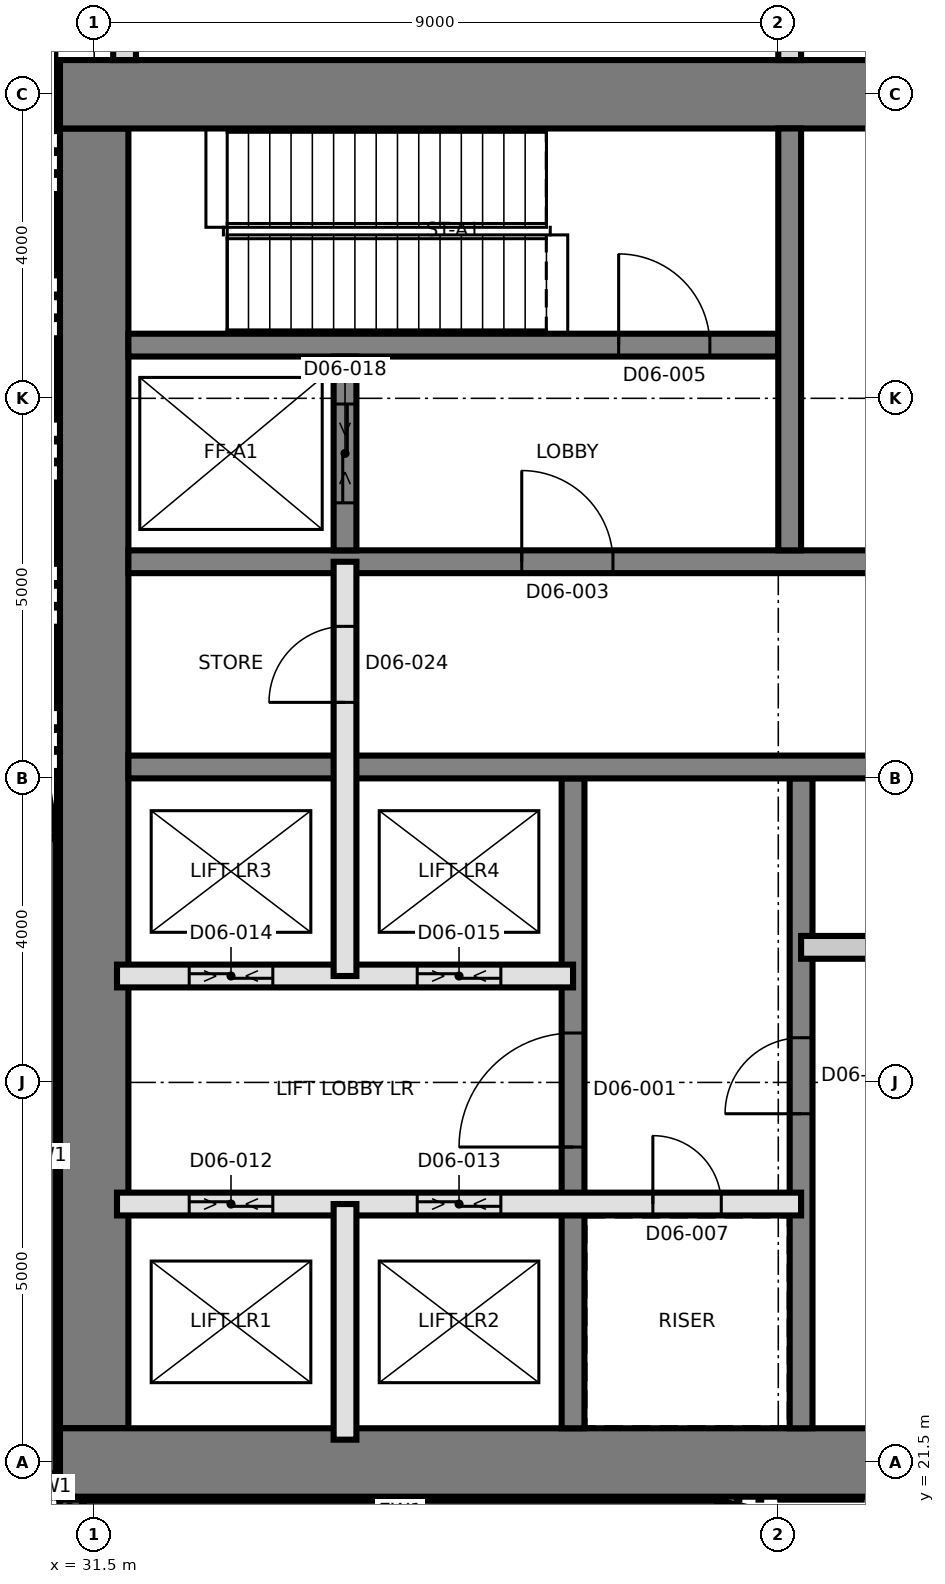
"""IFC4 building model, lengths in metres.
Left out: names, types, materials, properties, quantities, classifications, styles, units other than length and angle.
Written with IfcOpenShell. Run it as: python <this file> out.ifc"""

import sys

from ifc_helpers import new_model, si_unit, direction, frame, frame_2d, origin, place, context, subcontext, project, spatial, rectangle, extrude, element, fill, save


model = new_model("IFC4")
c1 = context("Model", 3, precision=1e-05, world=origin(), true_north=direction((0.0, 1.0)))
c2 = subcontext(c1, "Body", "Model", "MODEL_VIEW")
j1 = project(units=[si_unit("LENGTHUNIT", "METRE"), si_unit("PLANEANGLEUNIT", "RADIAN")], contexts=[c1])
p1 = place(None, origin())
s1 = spatial("IfcSite", under=j1, at=p1, CompositionType="ELEMENT")
p2 = place(p1, origin())
s2 = spatial("IfcBuilding", under=s1, at=p2, CompositionType="ELEMENT")
p3 = place(p2, frame((0.0, 0.0, 81.6)))
s3 = spatial("IfcBuildingStorey", under=s2, at=p3, CompositionType="ELEMENT", Elevation=81.6)
p4 = place(p3, frame((31.5, 21.95, 0.0), z_axis=(0.0, 0.0, 1.0), x_axis=(0.0, 1.0, 0.0)))
e1 = element("IfcWall", 1, at=p4, inside=s3, PredefinedType="SHEAR", context=c2, shape_type="SweptSolid", body=[
    extrude(rectangle(XDim=17.1, YDim=0.9, at=frame_2d((8.55, 0.0))), origin(), (0.0, 0.0, 1.0), 5.5),
])
p5 = place(p3, frame((31.05, 21.5, 0.0), z_axis=(0.0, 0.0, 1.0), x_axis=(1.0, 0.0, 0.0)))
e2 = element("IfcWall", 2, at=p5, inside=s3, PredefinedType="SHEAR", context=c2, shape_type="SweptSolid", body=[
    extrude(rectangle(XDim=27.0, YDim=0.9, at=frame_2d((13.5, 0.0))), origin(), (0.0, 0.0, 1.0), 5.5),
])
p6 = place(p3, frame((31.05, 39.5, 0.0), z_axis=(0.0, 0.0, 1.0), x_axis=(1.0, 0.0, 0.0)))
e3 = element("IfcWall", 3, at=p6, inside=s3, PredefinedType="SHEAR", context=c2, shape_type="SweptSolid", body=[
    extrude(rectangle(XDim=27.0, YDim=0.9, at=frame_2d((13.5, 0.0))), origin(), (0.0, 0.0, 1.0), 5.5),
])
p7 = place(p6, frame((10.65, 0.0, 0.0)))
e4 = element("IfcOpeningElement", 4, at=p7, cuts=e3, PredefinedType="OPENING", context=c2, shape_type="SweptSolid", body=[
    extrude(rectangle(XDim=1.2, YDim=2.1, at=frame_2d((0.6, 1.05))), frame((0.0, 0.46, 0.0), z_axis=(0.0, -1.0, 0.0), x_axis=(1.0, 0.0, 0.0)), (0.0, 0.0, 1.0), 0.92),
])
p8 = place(p3, frame((37.8, 21.95, 0.0), z_axis=(0.0, 0.0, 1.0), x_axis=(0.0, 1.0, 0.0)))
e5 = element("IfcWall", 5, at=p8, inside=s3, PredefinedType="SHEAR", context=c2, shape_type="SweptSolid", body=[
    extrude(rectangle(XDim=8.55, YDim=0.3, at=frame_2d((4.275, 0.0))), origin(), (0.0, 0.0, 1.0), 5.5),
])
p9 = place(p8, frame((3.7, 0.0, 0.0)))
e6 = element("IfcOpeningElement", 6, at=p9, cuts=e5, PredefinedType="OPENING", context=c2, shape_type="SweptSolid", body=[
    extrude(rectangle(XDim=1.5, YDim=2.1, at=frame_2d((0.75, 1.05))), frame((0.0, 0.16, 0.0), z_axis=(0.0, -1.0, 0.0), x_axis=(1.0, 0.0, 0.0)), (0.0, 0.0, 1.0), 0.32),
])
p10 = place(p3, frame((40.8, 21.95, 0.0), z_axis=(0.0, 0.0, 1.0), x_axis=(0.0, 1.0, 0.0)))
e7 = element("IfcWall", 7, at=p10, inside=s3, PredefinedType="SHEAR", context=c2, shape_type="SweptSolid", body=[
    extrude(rectangle(XDim=8.55, YDim=0.3, at=frame_2d((4.275, 0.0))), origin(), (0.0, 0.0, 1.0), 5.5),
])
p11 = place(p10, frame((4.138, 0.0, 0.0)))
e8 = element("IfcOpeningElement", 8, at=p11, cuts=e7, PredefinedType="OPENING", context=c2, shape_type="SweptSolid", body=[
    extrude(rectangle(XDim=1.0, YDim=2.1, at=frame_2d((0.5, 1.05))), frame((0.0, 0.16, 0.0), z_axis=(0.0, -1.0, 0.0), x_axis=(1.0, 0.0, 0.0)), (0.0, 0.0, 1.0), 0.32),
])
p12 = place(p3, frame((31.95, 30.65, 0.0), z_axis=(0.0, 0.0, 1.0), x_axis=(1.0, 0.0, 0.0)))
e9 = element("IfcWall", 9, at=p12, inside=s3, PredefinedType="SHEAR", context=c2, shape_type="SweptSolid", body=[
    extrude(rectangle(XDim=26.1, YDim=0.3, at=frame_2d((13.05, 0.0))), origin(), (0.0, 0.0, 1.0), 5.5),
])
p13 = place(p12, frame((24.55, 0.0, 0.0)))
e10 = element("IfcOpeningElement", 10, at=p13, cuts=e9, PredefinedType="OPENING", context=c2, shape_type="SweptSolid", body=[
    extrude(rectangle(XDim=1.0, YDim=2.1, at=frame_2d((0.5, 1.05))), frame((0.0, 0.16, 0.0), z_axis=(0.0, -1.0, 0.0), x_axis=(1.0, 0.0, 0.0)), (0.0, 0.0, 1.0), 0.32),
])
p14 = place(p12, frame((11.35, 0.0, 0.0)))
e11 = element("IfcOpeningElement", 11, at=p14, cuts=e9, PredefinedType="OPENING", context=c2, shape_type="SweptSolid", body=[
    extrude(rectangle(XDim=1.0, YDim=2.1, at=frame_2d((0.5, 1.05))), frame((0.0, 0.16, 0.0), z_axis=(0.0, -1.0, 0.0), x_axis=(1.0, 0.0, 0.0)), (0.0, 0.0, 1.0), 0.32),
])
p15 = place(p3, frame((31.95, 33.35, 0.0), z_axis=(0.0, 0.0, 1.0), x_axis=(1.0, 0.0, 0.0)))
e12 = element("IfcWall", 12, at=p15, inside=s3, PredefinedType="SHEAR", context=c2, shape_type="SweptSolid", body=[
    extrude(rectangle(XDim=26.1, YDim=0.3, at=frame_2d((13.05, 0.0))), origin(), (0.0, 0.0, 1.0), 5.5),
])
p16 = place(p15, frame((13.7, 0.0, 0.0)))
e13 = element("IfcOpeningElement", 13, at=p16, cuts=e12, PredefinedType="OPENING", context=c2, shape_type="SweptSolid", body=[
    extrude(rectangle(XDim=1.4, YDim=2.1, at=frame_2d((0.7, 1.05))), frame((0.0, 0.16, 0.0), z_axis=(0.0, -1.0, 0.0), x_axis=(1.0, 0.0, 0.0)), (0.0, 0.0, 1.0), 0.32),
])
p17 = place(p15, frame((5.175, 0.0, 0.0)))
e14 = element("IfcOpeningElement", 14, at=p17, cuts=e12, PredefinedType="OPENING", context=c2, shape_type="SweptSolid", body=[
    extrude(rectangle(XDim=1.2, YDim=2.1, at=frame_2d((0.6, 1.05))), frame((0.0, 0.16, 0.0), z_axis=(0.0, -1.0, 0.0), x_axis=(1.0, 0.0, 0.0)), (0.0, 0.0, 1.0), 0.32),
])
p18 = place(p15, frame((19.725, 0.0, 0.0)))
e15 = element("IfcOpeningElement", 15, at=p18, cuts=e12, PredefinedType="OPENING", context=c2, shape_type="SweptSolid", body=[
    extrude(rectangle(XDim=1.2, YDim=2.1, at=frame_2d((0.6, 1.05))), frame((0.0, 0.16, 0.0), z_axis=(0.0, -1.0, 0.0), x_axis=(1.0, 0.0, 0.0)), (0.0, 0.0, 1.0), 0.32),
])
p19 = place(p3, frame((31.95, 36.2, 0.0), z_axis=(0.0, 0.0, 1.0), x_axis=(1.0, 0.0, 0.0)))
e16 = element("IfcWall", 16, at=p19, inside=s3, PredefinedType="SHEAR", context=c2, shape_type="SweptSolid", body=[
    extrude(rectangle(XDim=8.55, YDim=0.3, at=frame_2d((4.275, 0.0))), origin(), (0.0, 0.0, 1.0), 5.5),
])
p20 = place(p19, frame((6.45, 0.0, 0.0)))
e17 = element("IfcOpeningElement", 17, at=p20, cuts=e16, PredefinedType="OPENING", context=c2, shape_type="SweptSolid", body=[
    extrude(rectangle(XDim=1.2, YDim=2.1, at=frame_2d((0.6, 1.05))), frame((0.0, 0.16, 0.0), z_axis=(0.0, -1.0, 0.0), x_axis=(1.0, 0.0, 0.0)), (0.0, 0.0, 1.0), 0.32),
])
p21 = place(p3, frame((40.65, 33.5, 0.0), z_axis=(0.0, 0.0, 1.0), x_axis=(0.0, 1.0, 0.0)))
e18 = element("IfcWall", 18, at=p21, inside=s3, PredefinedType="SHEAR", context=c2, shape_type="SweptSolid", body=[
    extrude(rectangle(XDim=5.55, YDim=0.3, at=frame_2d((2.775, 0.0))), origin(), (0.0, 0.0, 1.0), 5.5),
])
p22 = place(p3, frame((34.8, 33.5, 0.0), z_axis=(0.0, 0.0, 1.0), x_axis=(0.0, 1.0, 0.0)))
e19 = element("IfcWall", 19, at=p22, inside=s3, PredefinedType="SHEAR", context=c2, shape_type="SweptSolid", body=[
    extrude(rectangle(XDim=2.55, YDim=0.3, at=frame_2d((1.275, 0.0))), origin(), (0.0, 0.0, 1.0), 5.5),
])
p23 = place(p22, frame((0.625, 0.0, 0.0)))
e20 = element("IfcOpeningElement", 20, at=p23, cuts=e19, PredefinedType="OPENING", context=c2, shape_type="SweptSolid", body=[
    extrude(rectangle(XDim=1.3, YDim=2.4, at=frame_2d((0.65, 1.2))), frame((0.0, 0.16, 0.0), z_axis=(0.0, -1.0, 0.0), x_axis=(1.0, 0.0, 0.0)), (0.0, 0.0, 1.0), 0.32),
])
p24 = place(p3, frame((30.85, 29.699, 0.0), z_axis=(0.0, 0.0, 1.0), x_axis=(0.0, -1.0, 0.0)))
e21 = element("IfcWall", 21, at=p24, inside=s3, PredefinedType="SOLIDWALL", context=c2, shape_type="SweptSolid", body=[
    extrude(rectangle(XDim=8.34, YDim=0.3, at=frame_2d((4.17, 0.0))), origin(), (0.0, 0.0, 1.0), 5.2),
])
for number, where, z_axis, x_axis in (
    (22, (30.861, 21.302, 0.0), (0.0, 0.0, 1.0), (0.383, -0.924, 0.0)),
    (23, (31.048, 20.967, 0.0), (0.0, 0.0, 1.0), (0.924, -0.383, 0.0)),
):
    element("IfcWall", number, at=place(p3, frame(where, z_axis=z_axis, x_axis=x_axis)), inside=s3, PredefinedType="SOLIDWALL", context=c2, shape_type="SweptSolid", body=[
        extrude(rectangle(XDim=0.275, YDim=0.3, at=frame_2d((0.138, 0.0))), origin(), (0.0, 0.0, 1.0), 5.2),
    ])
p25 = place(p3, frame((31.36, 20.85, 0.0), z_axis=(0.0, 0.0, 1.0), x_axis=(1.0, 0.0, 0.0)))
e24 = element("IfcWall", 24, at=p25, inside=s3, PredefinedType="SOLIDWALL", context=c2, shape_type="SweptSolid", body=[
    extrude(rectangle(XDim=8.34, YDim=0.3, at=frame_2d((4.17, 0.0))), origin(), (0.0, 0.0, 1.0), 5.2),
])
p26 = place(p3, frame((39.735, 20.846, 0.0), z_axis=(0.0, 0.0, 1.0), x_axis=(0.97206095595, -0.234728562212, 0.0)))
e25 = element("IfcWall", 25, at=p26, inside=s3, PredefinedType="SOLIDWALL", context=c2, shape_type="SweptSolid", body=[
    extrude(rectangle(XDim=2.35, YDim=0.3, at=frame_2d((1.175, 0.0))), origin(), (0.0, 0.0, 1.0), 5.2),
])
p27 = place(p3, frame((30.152, 34.0, 0.0), z_axis=(0.0, 0.0, 1.0), x_axis=(0.160697303067, -0.987003736967, 0.0)))
e26 = element("IfcWall", 26, at=p27, inside=s3, PredefinedType="SOLIDWALL", context=c2, shape_type="SweptSolid", body=[
    extrude(rectangle(XDim=4.333, YDim=0.3, at=frame_2d((2.167, 0.0))), origin(), (0.0, 0.0, 1.0), 5.2),
])
p28 = place(p3, frame((31.8, 24.9, 0.0), z_axis=(0.0, 0.0, 1.0), x_axis=(1.0, 0.0, 0.0)))
e27 = element("IfcWall", 27, at=p28, inside=s3, PredefinedType="SOLIDWALL", context=c2, shape_type="SweptSolid", body=[
    extrude(rectangle(XDim=9.0, YDim=0.3, at=frame_2d((4.5, 0.0))), origin(), (0.0, 0.0, 1.0), 5.2),
])
p29 = place(p28, frame((7.05, 0.0, 0.0)))
e28 = element("IfcOpeningElement", 28, at=p29, cuts=e27, PredefinedType="OPENING", context=c2, shape_type="SweptSolid", body=[
    extrude(rectangle(XDim=0.9, YDim=2.1, at=frame_2d((0.45, 1.05))), frame((0.0, 0.16, 0.0), z_axis=(0.0, -1.0, 0.0), x_axis=(1.0, 0.0, 0.0)), (0.0, 0.0, 1.0), 0.32),
])
p30 = place(p28, frame((0.95, 0.0, 0.0)))
e29 = element("IfcOpeningElement", 29, at=p30, cuts=e27, PredefinedType="OPENING", context=c2, shape_type="SweptSolid", body=[
    extrude(rectangle(XDim=1.1, YDim=2.4, at=frame_2d((0.55, 1.2))), frame((0.0, 0.16, 0.0), z_axis=(0.0, -1.0, 0.0), x_axis=(1.0, 0.0, 0.0)), (0.0, 0.0, 1.0), 0.32),
])
p31 = place(p28, frame((3.95, 0.0, 0.0)))
e30 = element("IfcOpeningElement", 30, at=p31, cuts=e27, PredefinedType="OPENING", context=c2, shape_type="SweptSolid", body=[
    extrude(rectangle(XDim=1.1, YDim=2.4, at=frame_2d((0.55, 1.2))), frame((0.0, 0.16, 0.0), z_axis=(0.0, -1.0, 0.0), x_axis=(1.0, 0.0, 0.0)), (0.0, 0.0, 1.0), 0.32),
])
p32 = place(p3, frame((31.8, 27.9, 0.0), z_axis=(0.0, 0.0, 1.0), x_axis=(1.0, 0.0, 0.0)))
e31 = element("IfcWall", 31, at=p32, inside=s3, PredefinedType="SOLIDWALL", context=c2, shape_type="SweptSolid", body=[
    extrude(rectangle(XDim=6.0, YDim=0.3, at=frame_2d((3.0, 0.0))), origin(), (0.0, 0.0, 1.0), 5.2),
])
p33 = place(p32, frame((0.95, 0.0, 0.0)))
e32 = element("IfcOpeningElement", 32, at=p33, cuts=e31, PredefinedType="OPENING", context=c2, shape_type="SweptSolid", body=[
    extrude(rectangle(XDim=1.1, YDim=2.4, at=frame_2d((0.55, 1.2))), frame((0.0, 0.16, 0.0), z_axis=(0.0, -1.0, 0.0), x_axis=(1.0, 0.0, 0.0)), (0.0, 0.0, 1.0), 0.32),
])
p34 = place(p32, frame((3.95, 0.0, 0.0)))
e33 = element("IfcOpeningElement", 33, at=p34, cuts=e31, PredefinedType="OPENING", context=c2, shape_type="SweptSolid", body=[
    extrude(rectangle(XDim=1.1, YDim=2.4, at=frame_2d((0.55, 1.2))), frame((0.0, 0.16, 0.0), z_axis=(0.0, -1.0, 0.0), x_axis=(1.0, 0.0, 0.0)), (0.0, 0.0, 1.0), 0.32),
])
p35 = place(p3, frame((40.8, 28.277, 0.0), z_axis=(0.0, 0.0, 1.0), x_axis=(1.0, 0.0, 0.0)))
e34 = element("IfcWall", 34, at=p35, inside=s3, PredefinedType="PARTITIONING", context=c2, shape_type="SweptSolid", body=[
    extrude(rectangle(XDim=6.0, YDim=0.3, at=frame_2d((3.0, 0.0))), origin(), (0.0, 0.0, 1.0), 5.2),
])
p36 = place(p3, frame((34.8, 21.8, 0.0), z_axis=(0.0, 0.0, 1.0), x_axis=(0.0, 1.0, 0.0)))
e35 = element("IfcWall", 35, at=p36, inside=s3, PredefinedType="SOLIDWALL", context=c2, shape_type="SweptSolid", body=[
    extrude(rectangle(XDim=3.1, YDim=0.3, at=frame_2d((1.55, 0.0))), origin(), (0.0, 0.0, 1.0), 5.2),
])
p37 = place(p3, frame((34.8, 27.9, 0.0), z_axis=(0.0, 0.0, 1.0), x_axis=(0.0, 1.0, 0.0)))
e36 = element("IfcWall", 36, at=p37, inside=s3, PredefinedType="SOLIDWALL", context=c2, shape_type="SweptSolid", body=[
    extrude(rectangle(XDim=5.45, YDim=0.3, at=frame_2d((2.725, 0.0))), origin(), (0.0, 0.0, 1.0), 5.2),
])
p38 = place(p37, frame((3.6, 0.0, 0.0)))
e37 = element("IfcOpeningElement", 37, at=p38, cuts=e36, PredefinedType="OPENING", context=c2, shape_type="SweptSolid", body=[
    extrude(rectangle(XDim=1.0, YDim=2.1, at=frame_2d((0.5, 1.05))), frame((0.0, 0.16, 0.0), z_axis=(0.0, -1.0, 0.0), x_axis=(1.0, 0.0, 0.0)), (0.0, 0.0, 1.0), 0.32),
])
p39 = place(p3, frame((31.9, 39.95, 0.0), z_axis=(0.0, 0.0, 1.0), x_axis=(0.0, 1.0, 0.0)))
e38 = element("IfcWall", 38, at=p39, inside=s3, PredefinedType="PARTITIONING", context=c2, shape_type="SweptSolid", body=[
    extrude(rectangle(XDim=25.5, YDim=0.3, at=frame_2d((12.75, 0.0))), origin(), (0.0, 0.0, 1.0), 5.2),
])
p40 = place(p3, frame((40.65, 39.95, 0.0), z_axis=(0.0, 0.0, 1.0), x_axis=(0.0, 1.0, 0.0)))
e39 = element("IfcWall", 39, at=p40, inside=s3, PredefinedType="PARTITIONING", context=c2, shape_type="SweptSolid", body=[
    extrude(rectangle(XDim=25.8, YDim=0.3, at=frame_2d((12.9, 0.0))), origin(), (0.0, 0.0, 1.0), 5.2),
])
p41 = place(p40, frame((1.2, 0.0, 0.0)))
e40 = element("IfcOpeningElement", 40, at=p41, cuts=e39, PredefinedType="OPENING", context=c2, shape_type="SweptSolid", body=[
    extrude(rectangle(XDim=1.2, YDim=2.1, at=frame_2d((0.6, 1.05))), frame((0.0, 0.16, 0.0), z_axis=(0.0, -1.0, 0.0), x_axis=(1.0, 0.0, 0.0)), (0.0, 0.0, 1.0), 0.32),
])
p42 = place(p40, frame((5.7, 0.0, 0.0)))
e41 = element("IfcOpeningElement", 41, at=p42, cuts=e39, PredefinedType="OPENING", context=c2, shape_type="SweptSolid", body=[
    extrude(rectangle(XDim=1.2, YDim=2.1, at=frame_2d((0.6, 1.05))), frame((0.0, 0.16, 0.0), z_axis=(0.0, -1.0, 0.0), x_axis=(1.0, 0.0, 0.0)), (0.0, 0.0, 1.0), 0.32),
])
p43 = place(p40, frame((10.2, 0.0, 0.0)))
e42 = element("IfcOpeningElement", 42, at=p43, cuts=e39, PredefinedType="OPENING", context=c2, shape_type="SweptSolid", body=[
    extrude(rectangle(XDim=1.2, YDim=2.1, at=frame_2d((0.6, 1.05))), frame((0.0, 0.16, 0.0), z_axis=(0.0, -1.0, 0.0), x_axis=(1.0, 0.0, 0.0)), (0.0, 0.0, 1.0), 0.32),
])
p44 = place(p40, frame((14.7, 0.0, 0.0)))
e43 = element("IfcOpeningElement", 43, at=p44, cuts=e39, PredefinedType="OPENING", context=c2, shape_type="SweptSolid", body=[
    extrude(rectangle(XDim=1.2, YDim=2.1, at=frame_2d((0.6, 1.05))), frame((0.0, 0.16, 0.0), z_axis=(0.0, -1.0, 0.0), x_axis=(1.0, 0.0, 0.0)), (0.0, 0.0, 1.0), 0.32),
])
p45 = place(p40, frame((18.937, 0.0, 0.0)))
e44 = element("IfcOpeningElement", 44, at=p45, cuts=e39, PredefinedType="OPENING", context=c2, shape_type="SweptSolid", body=[
    extrude(rectangle(XDim=1.2, YDim=2.1, at=frame_2d((0.6, 1.05))), frame((0.0, 0.16, 0.0), z_axis=(0.0, -1.0, 0.0), x_axis=(1.0, 0.0, 0.0)), (0.0, 0.0, 1.0), 0.32),
])
p46 = place(p40, frame((22.913, 0.0, 0.0)))
e45 = element("IfcOpeningElement", 45, at=p46, cuts=e39, PredefinedType="OPENING", context=c2, shape_type="SweptSolid", body=[
    extrude(rectangle(XDim=1.2, YDim=2.1, at=frame_2d((0.6, 1.05))), frame((0.0, 0.16, 0.0), z_axis=(0.0, -1.0, 0.0), x_axis=(1.0, 0.0, 0.0)), (0.0, 0.0, 1.0), 0.32),
])
p47 = place(p9, origin())
e46 = element("IfcDoor", 46, at=p47, inside=s3, OperationType="SINGLE_SWING_LEFT", PredefinedType="DOOR", context=c2, shape_type="SweptSolid", body=[
    extrude(rectangle(XDim=1.5, YDim=2.1, at=frame_2d((0.75, 1.05))), frame((0.0, 0.025, 0.0), z_axis=(0.0, -1.0, 0.0), x_axis=(1.0, 0.0, 0.0)), (0.0, 0.0, 1.0), 0.05),
])
fill(e6, e46)
p48 = place(p17, origin())
e47 = element("IfcDoor", 47, at=p48, inside=s3, OperationType="SINGLE_SWING_LEFT", PredefinedType="DOOR", context=c2, shape_type="SweptSolid", body=[
    extrude(rectangle(XDim=1.2, YDim=2.1, at=frame_2d((0.6, 1.05))), frame((0.0, 0.025, 0.0), z_axis=(0.0, -1.0, 0.0), x_axis=(1.0, 0.0, 0.0)), (0.0, 0.0, 1.0), 0.05),
])
fill(e14, e47)
p49 = place(p20, origin())
e48 = element("IfcDoor", 48, at=p49, inside=s3, OperationType="SINGLE_SWING_RIGHT", PredefinedType="DOOR", context=c2, shape_type="SweptSolid", body=[
    extrude(rectangle(XDim=1.2, YDim=2.1, at=frame_2d((0.6, 1.05))), frame((0.0, 0.025, 0.0), z_axis=(0.0, -1.0, 0.0), x_axis=(1.0, 0.0, 0.0)), (0.0, 0.0, 1.0), 0.05),
])
fill(e17, e48)
p50 = place(p29, origin())
e49 = element("IfcDoor", 49, at=p50, inside=s3, OperationType="SINGLE_SWING_LEFT", PredefinedType="DOOR", context=c2, shape_type="SweptSolid", body=[
    extrude(rectangle(XDim=0.9, YDim=2.1, at=frame_2d((0.45, 1.05))), frame((0.0, 0.025, 0.0), z_axis=(0.0, -1.0, 0.0), x_axis=(1.0, 0.0, 0.0)), (0.0, 0.0, 1.0), 0.05),
])
fill(e28, e49)
p51 = place(p30, origin())
e50 = element("IfcDoor", 50, at=p51, inside=s3, OperationType="SLIDING_TO_LEFT", PredefinedType="DOOR", context=c2, shape_type="SweptSolid", body=[
    extrude(rectangle(XDim=1.1, YDim=2.4, at=frame_2d((0.55, 1.2))), frame((0.0, 0.025, 0.0), z_axis=(0.0, -1.0, 0.0), x_axis=(1.0, 0.0, 0.0)), (0.0, 0.0, 1.0), 0.05),
])
fill(e29, e50)
p52 = place(p31, origin())
e51 = element("IfcDoor", 51, at=p52, inside=s3, OperationType="SLIDING_TO_LEFT", PredefinedType="DOOR", context=c2, shape_type="SweptSolid", body=[
    extrude(rectangle(XDim=1.1, YDim=2.4, at=frame_2d((0.55, 1.2))), frame((0.0, 0.025, 0.0), z_axis=(0.0, -1.0, 0.0), x_axis=(1.0, 0.0, 0.0)), (0.0, 0.0, 1.0), 0.05),
])
fill(e30, e51)
p53 = place(p33, origin())
e52 = element("IfcDoor", 52, at=p53, inside=s3, OperationType="SLIDING_TO_LEFT", PredefinedType="DOOR", context=c2, shape_type="SweptSolid", body=[
    extrude(rectangle(XDim=1.1, YDim=2.4, at=frame_2d((0.55, 1.2))), frame((0.0, 0.025, 0.0), z_axis=(0.0, -1.0, 0.0), x_axis=(1.0, 0.0, 0.0)), (0.0, 0.0, 1.0), 0.05),
])
fill(e32, e52)
p54 = place(p34, origin())
e53 = element("IfcDoor", 53, at=p54, inside=s3, OperationType="SLIDING_TO_LEFT", PredefinedType="DOOR", context=c2, shape_type="SweptSolid", body=[
    extrude(rectangle(XDim=1.1, YDim=2.4, at=frame_2d((0.55, 1.2))), frame((0.0, 0.025, 0.0), z_axis=(0.0, -1.0, 0.0), x_axis=(1.0, 0.0, 0.0)), (0.0, 0.0, 1.0), 0.05),
])
fill(e33, e53)
p55 = place(p23, origin())
e54 = element("IfcDoor", 54, at=p55, inside=s3, OperationType="SLIDING_TO_LEFT", PredefinedType="DOOR", context=c2, shape_type="SweptSolid", body=[
    extrude(rectangle(XDim=1.3, YDim=2.4, at=frame_2d((0.65, 1.2))), frame((0.0, 0.025, 0.0), z_axis=(0.0, -1.0, 0.0), x_axis=(1.0, 0.0, 0.0)), (0.0, 0.0, 1.0), 0.05),
])
fill(e20, e54)
p56 = place(p11, origin())
e55 = element("IfcDoor", 55, at=p56, inside=s3, OperationType="SINGLE_SWING_RIGHT", PredefinedType="DOOR", context=c2, shape_type="SweptSolid", body=[
    extrude(rectangle(XDim=1.0, YDim=2.1, at=frame_2d((0.5, 1.05))), frame((0.0, 0.025, 0.0), z_axis=(0.0, -1.0, 0.0), x_axis=(1.0, 0.0, 0.0)), (0.0, 0.0, 1.0), 0.05),
])
fill(e8, e55)
p57 = place(p38, origin())
e56 = element("IfcDoor", 56, at=p57, inside=s3, OperationType="SINGLE_SWING_LEFT", PredefinedType="DOOR", context=c2, shape_type="SweptSolid", body=[
    extrude(rectangle(XDim=1.0, YDim=2.1, at=frame_2d((0.5, 1.05))), frame((0.0, 0.025, 0.0), z_axis=(0.0, -1.0, 0.0), x_axis=(1.0, 0.0, 0.0)), (0.0, 0.0, 1.0), 0.05),
])
fill(e37, e56)
save(model, sys.argv[1])
